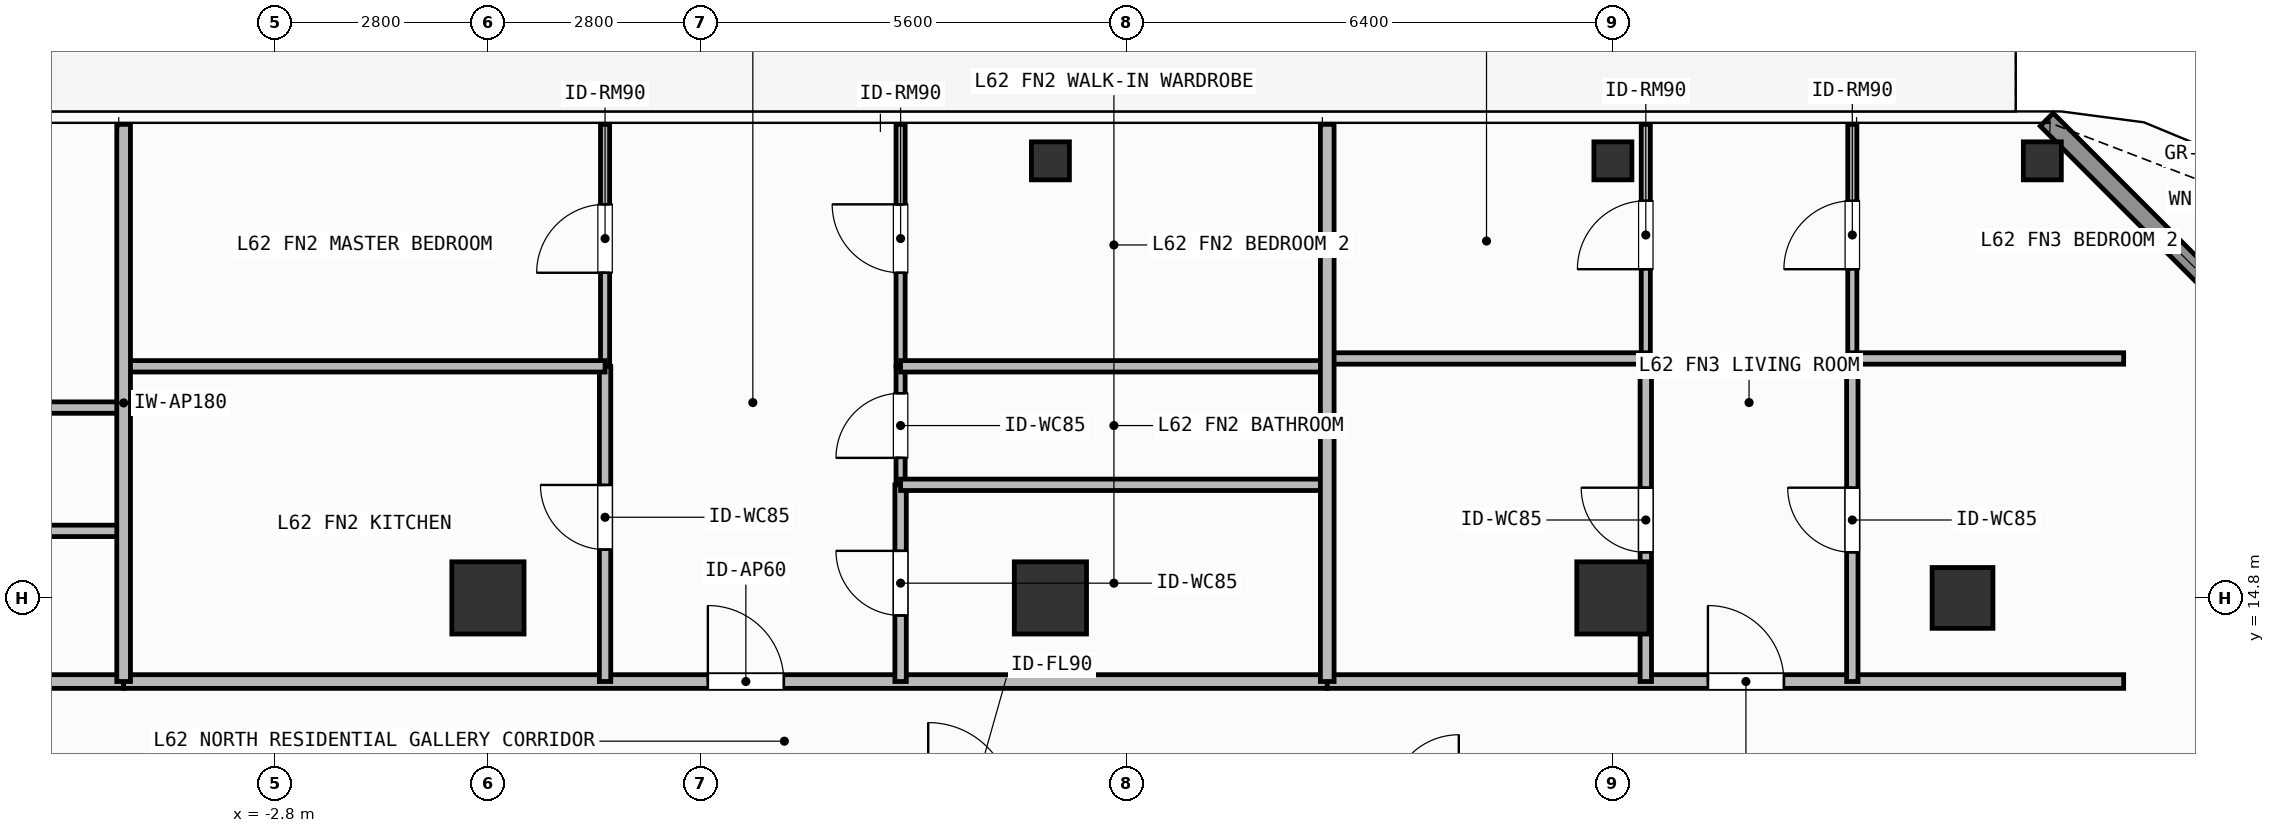
"""IFC4 building model, lengths in metres.
Left out: names, types, materials, properties, quantities, classifications, styles, units other than length and angle.
Written with IfcOpenShell. Run it as: python <this file> out.ifc"""

import sys

from ifc_helpers import new_model, si_unit, direction, frame, frame_2d, origin, origin_2d, place, context, subcontext, project, spatial, rectangle, hollow_rectangle, extrude, element, fill, save


model = new_model("IFC4")
c1 = context("Model", 3, precision=1e-05, world=origin(), true_north=direction((0.0, 1.0)))
c2 = subcontext(c1, "Body", "Model", "MODEL_VIEW")
j1 = project(units=[si_unit("LENGTHUNIT", "METRE"), si_unit("PLANEANGLEUNIT", "RADIAN")], contexts=[c1])
p1 = place(None, origin())
s1 = spatial("IfcSite", under=j1, at=p1, CompositionType="ELEMENT")
p2 = place(p1, origin())
s2 = spatial("IfcBuilding", under=s1, at=p2, CompositionType="ELEMENT")
p3 = place(p2, frame((0.0, 0.0, 254.7)))
s3 = spatial("IfcBuildingStorey", under=s2, at=p3, CompositionType="ELEMENT", Elevation=254.7)
for number, where, z_axis, x_axis in (
    (1, (0.0, 14.8, 0.0), (0.0, 0.0, 1.0), (1.0, 0.0, 0.0)),
    (2, (7.4, 14.8, 0.0), (0.0, 0.0, 1.0), (1.0, 0.0, 0.0)),
    (3, (14.8, 14.8, 0.0), (0.0, 0.0, 1.0), (1.0, 0.0, 0.0)),
):
    element("IfcColumn", number, at=place(p3, frame(where, z_axis=z_axis, x_axis=x_axis)), inside=s3, PredefinedType="COLUMN", context=c2, shape_type="SweptSolid", body=[
        extrude(rectangle(XDim=0.95, YDim=0.95, at=origin_2d()), origin(), (0.0, 0.0, 1.0), 3.9),
    ])
p4 = place(p3, frame((19.4, 14.8, 0.0), z_axis=(0.0, 0.0, 1.0), x_axis=(1.0, 0.0, 0.0)))
e4 = element("IfcColumn", 4, at=p4, inside=s3, PredefinedType="COLUMN", context=c2, shape_type="SweptSolid", body=[
    extrude(hollow_rectangle(XDim=0.8, YDim=0.8, WallThickness=0.036, at=origin_2d()), origin(), (0.0, 0.0, 1.0), 3.9),
])
for number, where, z_axis, x_axis in (
    (5, (20.45, 20.55, 0.0), (0.0, 0.0, 1.0), (1.0, 0.0, 0.0)),
    (6, (7.4, 20.55, 0.0), (0.0, 0.0, 1.0), (1.0, 0.0, 0.0)),
    (7, (14.8, 20.55, 0.0), (0.0, 0.0, 1.0), (1.0, 0.0, 0.0)),
):
    element("IfcColumn", number, at=place(p3, frame(where, z_axis=z_axis, x_axis=x_axis)), inside=s3, PredefinedType="COLUMN", context=c2, shape_type="SweptSolid", body=[
        extrude(hollow_rectangle(XDim=0.5, YDim=0.5, WallThickness=0.025, at=origin_2d()), origin(), (0.0, 0.0, 1.0), 3.9),
    ])
p5 = place(p3, frame((20.508, 21.092, 0.0), z_axis=(0.0, 0.0, 1.0), x_axis=(0.707126925818, -0.707086635981, 0.0)))
e8 = element("IfcWall", 8, at=p5, inside=s3, PredefinedType="SOLIDWALL", context=c2, shape_type="SweptSolid", body=[
    extrude(rectangle(XDim=6.06, YDim=0.24, at=frame_2d((3.03, 0.0))), origin(), (0.0, 0.0, 1.0), 3.68),
])
p6 = place(p5, frame((2.28, 0.0, 0.8)))
e9 = element("IfcOpeningElement", 9, at=p6, cuts=e8, PredefinedType="OPENING", context=c2, shape_type="SweptSolid", body=[
    extrude(rectangle(XDim=1.5, YDim=1.85, at=frame_2d((0.75, 0.925))), frame((0.0, 0.13, 0.0), z_axis=(0.0, -1.0, 0.0), x_axis=(1.0, 0.0, 0.0)), (0.0, 0.0, 1.0), 0.26),
])
p7 = place(p3, frame((-13.72, 13.7, 0.0), z_axis=(0.0, 0.0, 1.0), x_axis=(1.0, 0.0, 0.0)))
e10 = element("IfcWall", 10, at=p7, inside=s3, PredefinedType="PARTITIONING", context=c2, shape_type="SweptSolid", body=[
    extrude(rectangle(XDim=8.927, YDim=0.18, at=frame_2d((4.463, 0.0))), origin(), (0.0, 0.0, 1.0), 3.68),
])
p8 = place(p7, frame((1.752, 0.0, 0.0)))
e11 = element("IfcOpeningElement", 11, at=p8, cuts=e10, PredefinedType="OPENING", context=c2, shape_type="SweptSolid", body=[
    extrude(rectangle(XDim=1.0, YDim=2.2, at=frame_2d((0.5, 1.1))), frame((0.0, 0.1, 0.0), z_axis=(0.0, -1.0, 0.0), x_axis=(1.0, 0.0, 0.0)), (0.0, 0.0, 1.0), 0.2),
])
p9 = place(p3, frame((-4.793, 13.7, 0.0), z_axis=(0.0, 0.0, 1.0), x_axis=(1.0, 0.0, 0.0)))
e12 = element("IfcWall", 12, at=p9, inside=s3, PredefinedType="PARTITIONING", context=c2, shape_type="SweptSolid", body=[
    extrude(rectangle(XDim=15.835, YDim=0.18, at=frame_2d((7.917, 0.0))), origin(), (0.0, 0.0, 1.0), 3.68),
])
p10 = place(p9, frame((7.686, 0.0, 0.0)))
e13 = element("IfcOpeningElement", 13, at=p10, cuts=e12, PredefinedType="OPENING", context=c2, shape_type="SweptSolid", body=[
    extrude(rectangle(XDim=1.0, YDim=2.2, at=frame_2d((0.5, 1.1))), frame((0.0, 0.1, 0.0), z_axis=(0.0, -1.0, 0.0), x_axis=(1.0, 0.0, 0.0)), (0.0, 0.0, 1.0), 0.2),
])
p11 = place(p3, frame((1.541, 13.7, 0.0), z_axis=(0.0, 0.0, 1.0), x_axis=(0.0, 1.0, 0.0)))
e14 = element("IfcWall", 14, at=p11, inside=s3, PredefinedType="PARTITIONING", context=c2, shape_type="SweptSolid", body=[
    extrude(rectangle(XDim=4.147, YDim=0.15, at=frame_2d((2.073, 0.0))), origin(), (0.0, 0.0, 1.0), 3.68),
])
p12 = place(p11, frame((1.736, 0.0, 0.0)))
e15 = element("IfcOpeningElement", 15, at=p12, cuts=e14, PredefinedType="OPENING", context=c2, shape_type="SweptSolid", body=[
    extrude(rectangle(XDim=0.85, YDim=2.1, at=frame_2d((0.425, 1.05))), frame((0.0, 0.085, 0.0), z_axis=(0.0, -1.0, 0.0), x_axis=(1.0, 0.0, 0.0)), (0.0, 0.0, 1.0), 0.17),
])
p13 = place(p3, frame((1.541, 17.847, 0.0), z_axis=(0.0, 0.0, 1.0), x_axis=(0.0, 1.0, 0.0)))
e16 = element("IfcWall", 16, at=p13, inside=s3, PredefinedType="PARTITIONING", context=c2, shape_type="SweptSolid", body=[
    extrude(rectangle(XDim=3.183, YDim=0.12, at=frame_2d((1.592, 0.0))), origin(), (0.0, 0.0, 1.0), 3.68),
])
p14 = place(p13, frame((1.231, 0.0, 0.0)))
e17 = element("IfcOpeningElement", 17, at=p14, cuts=e16, PredefinedType="OPENING", context=c2, shape_type="SweptSolid", body=[
    extrude(rectangle(XDim=0.9, YDim=2.1, at=frame_2d((0.45, 1.05))), frame((0.0, 0.07, 0.0), z_axis=(0.0, -1.0, 0.0), x_axis=(1.0, 0.0, 0.0)), (0.0, 0.0, 1.0), 0.14),
])
p15 = place(p3, frame((5.429, 13.7, 0.0), z_axis=(0.0, 0.0, 1.0), x_axis=(0.0, 1.0, 0.0)))
e18 = element("IfcWall", 18, at=p15, inside=s3, PredefinedType="PARTITIONING", context=c2, shape_type="SweptSolid", body=[
    extrude(rectangle(XDim=2.588, YDim=0.15, at=frame_2d((1.294, 0.0))), origin(), (0.0, 0.0, 1.0), 3.68),
])
p16 = place(p15, frame((0.869, 0.0, 0.0)))
e19 = element("IfcOpeningElement", 19, at=p16, cuts=e18, PredefinedType="OPENING", context=c2, shape_type="SweptSolid", body=[
    extrude(rectangle(XDim=0.85, YDim=2.1, at=frame_2d((0.425, 1.05))), frame((0.0, 0.085, 0.0), z_axis=(0.0, -1.0, 0.0), x_axis=(1.0, 0.0, 0.0)), (0.0, 0.0, 1.0), 0.17),
])
p17 = place(p3, frame((5.429, 16.288, 0.0), z_axis=(0.0, 0.0, 1.0), x_axis=(0.0, 1.0, 0.0)))
e20 = element("IfcWall", 20, at=p17, inside=s3, PredefinedType="PARTITIONING", context=c2, shape_type="SweptSolid", body=[
    extrude(rectangle(XDim=1.559, YDim=0.12, at=frame_2d((0.779, 0.0))), origin(), (0.0, 0.0, 1.0), 3.68),
])
p18 = place(p17, frame((0.354, 0.0, 0.0)))
e21 = element("IfcOpeningElement", 21, at=p18, cuts=e20, PredefinedType="OPENING", context=c2, shape_type="SweptSolid", body=[
    extrude(rectangle(XDim=0.85, YDim=2.1, at=frame_2d((0.425, 1.05))), frame((0.0, 0.07, 0.0), z_axis=(0.0, -1.0, 0.0), x_axis=(1.0, 0.0, 0.0)), (0.0, 0.0, 1.0), 0.14),
])
p19 = place(p3, frame((5.429, 17.847, 0.0), z_axis=(0.0, 0.0, 1.0), x_axis=(0.0, 1.0, 0.0)))
e22 = element("IfcWall", 22, at=p19, inside=s3, PredefinedType="PARTITIONING", context=c2, shape_type="SweptSolid", body=[
    extrude(rectangle(XDim=3.183, YDim=0.12, at=frame_2d((1.592, 0.0))), origin(), (0.0, 0.0, 1.0), 3.68),
])
p20 = place(p19, frame((1.231, 0.0, 0.0)))
e23 = element("IfcOpeningElement", 23, at=p20, cuts=e22, PredefinedType="OPENING", context=c2, shape_type="SweptSolid", body=[
    extrude(rectangle(XDim=0.9, YDim=2.1, at=frame_2d((0.45, 1.05))), frame((0.0, 0.07, 0.0), z_axis=(0.0, -1.0, 0.0), x_axis=(1.0, 0.0, 0.0)), (0.0, 0.0, 1.0), 0.14),
])
p21 = place(p3, frame((11.042, 13.7, 0.0), z_axis=(0.0, 0.0, 1.0), x_axis=(1.0, 0.0, 0.0)))
e24 = element("IfcWall", 24, at=p21, inside=s3, PredefinedType="PARTITIONING", context=c2, shape_type="SweptSolid", body=[
    extrude(rectangle(XDim=10.478, YDim=0.18, at=frame_2d((5.239, 0.0))), origin(), (0.0, 0.0, 1.0), 3.68),
])
p22 = place(p21, frame((5.008, 0.0, 0.0)))
e25 = element("IfcOpeningElement", 25, at=p22, cuts=e24, PredefinedType="OPENING", context=c2, shape_type="SweptSolid", body=[
    extrude(rectangle(XDim=1.0, YDim=2.2, at=frame_2d((0.5, 1.1))), frame((0.0, 0.1, 0.0), z_axis=(0.0, -1.0, 0.0), x_axis=(1.0, 0.0, 0.0)), (0.0, 0.0, 1.0), 0.2),
])
p23 = place(p3, frame((15.233, 13.7, 0.0), z_axis=(0.0, 0.0, 1.0), x_axis=(0.0, 1.0, 0.0)))
e26 = element("IfcWall", 26, at=p23, inside=s3, PredefinedType="PARTITIONING", context=c2, shape_type="SweptSolid", body=[
    extrude(rectangle(XDim=4.25, YDim=0.15, at=frame_2d((2.125, 0.0))), origin(), (0.0, 0.0, 1.0), 3.68),
])
p24 = place(p23, frame((1.7, 0.0, 0.0)))
e27 = element("IfcOpeningElement", 27, at=p24, cuts=e26, PredefinedType="OPENING", context=c2, shape_type="SweptSolid", body=[
    extrude(rectangle(XDim=0.85, YDim=2.1, at=frame_2d((0.425, 1.05))), frame((0.0, 0.085, 0.0), z_axis=(0.0, -1.0, 0.0), x_axis=(1.0, 0.0, 0.0)), (0.0, 0.0, 1.0), 0.17),
])
p25 = place(p3, frame((15.233, 17.95, 0.0), z_axis=(0.0, 0.0, 1.0), x_axis=(0.0, 1.0, 0.0)))
e28 = element("IfcWall", 28, at=p25, inside=s3, PredefinedType="PARTITIONING", context=c2, shape_type="SweptSolid", body=[
    extrude(rectangle(XDim=3.08, YDim=0.12, at=frame_2d((1.54, 0.0))), origin(), (0.0, 0.0, 1.0), 3.68),
])
p26 = place(p25, frame((1.175, 0.0, 0.0)))
e29 = element("IfcOpeningElement", 29, at=p26, cuts=e28, PredefinedType="OPENING", context=c2, shape_type="SweptSolid", body=[
    extrude(rectangle(XDim=0.9, YDim=2.1, at=frame_2d((0.45, 1.05))), frame((0.0, 0.07, 0.0), z_axis=(0.0, -1.0, 0.0), x_axis=(1.0, 0.0, 0.0)), (0.0, 0.0, 1.0), 0.14),
])
p27 = place(p3, frame((17.95, 13.7, 0.0), z_axis=(0.0, 0.0, 1.0), x_axis=(0.0, 1.0, 0.0)))
e30 = element("IfcWall", 30, at=p27, inside=s3, PredefinedType="PARTITIONING", context=c2, shape_type="SweptSolid", body=[
    extrude(rectangle(XDim=4.25, YDim=0.15, at=frame_2d((2.125, 0.0))), origin(), (0.0, 0.0, 1.0), 3.68),
])
p28 = place(p27, frame((1.7, 0.0, 0.0)))
e31 = element("IfcOpeningElement", 31, at=p28, cuts=e30, PredefinedType="OPENING", context=c2, shape_type="SweptSolid", body=[
    extrude(rectangle(XDim=0.85, YDim=2.1, at=frame_2d((0.425, 1.05))), frame((0.0, 0.085, 0.0), z_axis=(0.0, -1.0, 0.0), x_axis=(1.0, 0.0, 0.0)), (0.0, 0.0, 1.0), 0.17),
])
p29 = place(p3, frame((17.95, 17.95, 0.0), z_axis=(0.0, 0.0, 1.0), x_axis=(0.0, 1.0, 0.0)))
e32 = element("IfcWall", 32, at=p29, inside=s3, PredefinedType="PARTITIONING", context=c2, shape_type="SweptSolid", body=[
    extrude(rectangle(XDim=3.08, YDim=0.12, at=frame_2d((1.54, 0.0))), origin(), (0.0, 0.0, 1.0), 3.68),
])
p30 = place(p29, frame((1.175, 0.0, 0.0)))
e33 = element("IfcOpeningElement", 33, at=p30, cuts=e32, PredefinedType="OPENING", context=c2, shape_type="SweptSolid", body=[
    extrude(rectangle(XDim=0.9, YDim=2.1, at=frame_2d((0.45, 1.05))), frame((0.0, 0.07, 0.0), z_axis=(0.0, -1.0, 0.0), x_axis=(1.0, 0.0, 0.0)), (0.0, 0.0, 1.0), 0.14),
])
for number, where, z_axis, x_axis in (
    (34, (-9.792, 15.682, 0.0), (0.0, 0.0, 1.0), (1.0, 0.0, 0.0)),
    (35, (-9.792, 17.304, 0.0), (0.0, 0.0, 1.0), (1.0, 0.0, 0.0)),
):
    element("IfcWall", number, at=place(p3, frame(where, z_axis=z_axis, x_axis=x_axis)), inside=s3, PredefinedType="PARTITIONING", context=c2, shape_type="SweptSolid", body=[
        extrude(rectangle(XDim=4.999, YDim=0.15, at=frame_2d((2.5, 0.0))), origin(), (0.0, 0.0, 1.0), 3.68),
    ])
p31 = place(p3, frame((-4.793, 17.847, 0.0), z_axis=(0.0, 0.0, 1.0), x_axis=(1.0, 0.0, 0.0)))
e36 = element("IfcWall", 36, at=p31, inside=s3, PredefinedType="PARTITIONING", context=c2, shape_type="SweptSolid", body=[
    extrude(rectangle(XDim=6.334, YDim=0.15, at=frame_2d((3.167, 0.0))), origin(), (0.0, 0.0, 1.0), 3.68),
])
for number, where, z_axis, x_axis in (
    (37, (5.429, 16.288, 0.0), (0.0, 0.0, 1.0), (1.0, 0.0, 0.0)),
    (38, (5.429, 17.847, 0.0), (0.0, 0.0, 1.0), (1.0, 0.0, 0.0)),
):
    element("IfcWall", number, at=place(p3, frame(where, z_axis=z_axis, x_axis=x_axis)), inside=s3, PredefinedType="PARTITIONING", context=c2, shape_type="SweptSolid", body=[
        extrude(rectangle(XDim=5.613, YDim=0.15, at=frame_2d((2.807, 0.0))), origin(), (0.0, 0.0, 1.0), 3.68),
    ])
p32 = place(p3, frame((-4.793, 13.7, 0.0), z_axis=(0.0, 0.0, 1.0), x_axis=(0.0, 1.0, 0.0)))
e39 = element("IfcWall", 39, at=p32, inside=s3, PredefinedType="PARTITIONING", context=c2, shape_type="SweptSolid", body=[
    extrude(rectangle(XDim=7.33, YDim=0.18, at=frame_2d((3.665, 0.0))), origin(), (0.0, 0.0, 1.0), 3.68),
])
p33 = place(p3, frame((11.042, 17.95, 0.0), z_axis=(0.0, 0.0, 1.0), x_axis=(1.0, 0.0, 0.0)))
e40 = element("IfcWall", 40, at=p33, inside=s3, PredefinedType="PARTITIONING", context=c2, shape_type="SweptSolid", body=[
    extrude(rectangle(XDim=4.191, YDim=0.15, at=frame_2d((2.095, 0.0))), origin(), (0.0, 0.0, 1.0), 3.68),
])
p34 = place(p3, frame((17.95, 17.95, 0.0), z_axis=(0.0, 0.0, 1.0), x_axis=(1.0, 0.0, 0.0)))
e41 = element("IfcWall", 41, at=p34, inside=s3, PredefinedType="PARTITIONING", context=c2, shape_type="SweptSolid", body=[
    extrude(rectangle(XDim=3.57, YDim=0.15, at=frame_2d((1.785, 0.0))), origin(), (0.0, 0.0, 1.0), 3.68),
])
p35 = place(p3, frame((11.042, 13.7, 0.0), z_axis=(0.0, 0.0, 1.0), x_axis=(0.0, 1.0, 0.0)))
e42 = element("IfcWall", 42, at=p35, inside=s3, PredefinedType="PARTITIONING", context=c2, shape_type="SweptSolid", body=[
    extrude(rectangle(XDim=7.33, YDim=0.18, at=frame_2d((3.665, 0.0))), origin(), (0.0, 0.0, 1.0), 3.42),
])
p36 = place(p6, origin())
e43 = element("IfcWindow", 43, at=p36, inside=s3, PartitioningType="SINGLE_PANEL", PredefinedType="WINDOW", context=c2, shape_type="SweptSolid", body=[
    extrude(rectangle(XDim=1.5, YDim=1.85, at=frame_2d((0.75, 0.925))), frame((0.0, 0.03, 0.0), z_axis=(0.0, -1.0, 0.0), x_axis=(1.0, 0.0, 0.0)), (0.0, 0.0, 1.0), 0.06),
])
fill(e9, e43)
p37 = place(p10, origin())
e44 = element("IfcDoor", 44, at=p37, inside=s3, OperationType="SINGLE_SWING_LEFT", PredefinedType="DOOR", context=c2, shape_type="SweptSolid", body=[
    extrude(rectangle(XDim=1.0, YDim=2.2, at=frame_2d((0.5, 1.1))), frame((0.0, 0.025, 0.0), z_axis=(0.0, -1.0, 0.0), x_axis=(1.0, 0.0, 0.0)), (0.0, 0.0, 1.0), 0.05),
])
fill(e13, e44)
p38 = place(p12, origin())
e45 = element("IfcDoor", 45, at=p38, inside=s3, OperationType="SINGLE_SWING_RIGHT", PredefinedType="DOOR", context=c2, shape_type="SweptSolid", body=[
    extrude(rectangle(XDim=0.85, YDim=2.1, at=frame_2d((0.425, 1.05))), frame((0.0, 0.025, 0.0), z_axis=(0.0, -1.0, 0.0), x_axis=(1.0, 0.0, 0.0)), (0.0, 0.0, 1.0), 0.05),
])
fill(e15, e45)
p39 = place(p14, origin())
e46 = element("IfcDoor", 46, at=p39, inside=s3, OperationType="SINGLE_SWING_LEFT", PredefinedType="DOOR", context=c2, shape_type="SweptSolid", body=[
    extrude(rectangle(XDim=0.9, YDim=2.1, at=frame_2d((0.45, 1.05))), frame((0.0, 0.025, 0.0), z_axis=(0.0, -1.0, 0.0), x_axis=(1.0, 0.0, 0.0)), (0.0, 0.0, 1.0), 0.05),
])
fill(e17, e46)
p40 = place(p16, origin())
e47 = element("IfcDoor", 47, at=p40, inside=s3, OperationType="SINGLE_SWING_RIGHT", PredefinedType="DOOR", context=c2, shape_type="SweptSolid", body=[
    extrude(rectangle(XDim=0.85, YDim=2.1, at=frame_2d((0.425, 1.05))), frame((0.0, 0.025, 0.0), z_axis=(0.0, -1.0, 0.0), x_axis=(1.0, 0.0, 0.0)), (0.0, 0.0, 1.0), 0.05),
])
fill(e19, e47)
p41 = place(p18, origin())
e48 = element("IfcDoor", 48, at=p41, inside=s3, OperationType="SINGLE_SWING_LEFT", PredefinedType="DOOR", context=c2, shape_type="SweptSolid", body=[
    extrude(rectangle(XDim=0.85, YDim=2.1, at=frame_2d((0.425, 1.05))), frame((0.0, 0.025, 0.0), z_axis=(0.0, -1.0, 0.0), x_axis=(1.0, 0.0, 0.0)), (0.0, 0.0, 1.0), 0.05),
])
fill(e21, e48)
p42 = place(p20, origin())
e49 = element("IfcDoor", 49, at=p42, inside=s3, OperationType="SINGLE_SWING_RIGHT", PredefinedType="DOOR", context=c2, shape_type="SweptSolid", body=[
    extrude(rectangle(XDim=0.9, YDim=2.1, at=frame_2d((0.45, 1.05))), frame((0.0, 0.025, 0.0), z_axis=(0.0, -1.0, 0.0), x_axis=(1.0, 0.0, 0.0)), (0.0, 0.0, 1.0), 0.05),
])
fill(e23, e49)
p43 = place(p22, origin())
e50 = element("IfcDoor", 50, at=p43, inside=s3, OperationType="SINGLE_SWING_LEFT", PredefinedType="DOOR", context=c2, shape_type="SweptSolid", body=[
    extrude(rectangle(XDim=1.0, YDim=2.2, at=frame_2d((0.5, 1.1))), frame((0.0, 0.025, 0.0), z_axis=(0.0, -1.0, 0.0), x_axis=(1.0, 0.0, 0.0)), (0.0, 0.0, 1.0), 0.05),
])
fill(e25, e50)
p44 = place(p24, origin())
e51 = element("IfcDoor", 51, at=p44, inside=s3, OperationType="SINGLE_SWING_RIGHT", PredefinedType="DOOR", context=c2, shape_type="SweptSolid", body=[
    extrude(rectangle(XDim=0.85, YDim=2.1, at=frame_2d((0.425, 1.05))), frame((0.0, 0.025, 0.0), z_axis=(0.0, -1.0, 0.0), x_axis=(1.0, 0.0, 0.0)), (0.0, 0.0, 1.0), 0.05),
])
fill(e27, e51)
p45 = place(p26, origin())
e52 = element("IfcDoor", 52, at=p45, inside=s3, OperationType="SINGLE_SWING_LEFT", PredefinedType="DOOR", context=c2, shape_type="SweptSolid", body=[
    extrude(rectangle(XDim=0.9, YDim=2.1, at=frame_2d((0.45, 1.05))), frame((0.0, 0.025, 0.0), z_axis=(0.0, -1.0, 0.0), x_axis=(1.0, 0.0, 0.0)), (0.0, 0.0, 1.0), 0.05),
])
fill(e29, e52)
p46 = place(p28, origin())
e53 = element("IfcDoor", 53, at=p46, inside=s3, OperationType="SINGLE_SWING_RIGHT", PredefinedType="DOOR", context=c2, shape_type="SweptSolid", body=[
    extrude(rectangle(XDim=0.85, YDim=2.1, at=frame_2d((0.425, 1.05))), frame((0.0, 0.025, 0.0), z_axis=(0.0, -1.0, 0.0), x_axis=(1.0, 0.0, 0.0)), (0.0, 0.0, 1.0), 0.05),
])
fill(e31, e53)
p47 = place(p30, origin())
e54 = element("IfcDoor", 54, at=p47, inside=s3, OperationType="SINGLE_SWING_LEFT", PredefinedType="DOOR", context=c2, shape_type="SweptSolid", body=[
    extrude(rectangle(XDim=0.9, YDim=2.1, at=frame_2d((0.45, 1.05))), frame((0.0, 0.025, 0.0), z_axis=(0.0, -1.0, 0.0), x_axis=(1.0, 0.0, 0.0)), (0.0, 0.0, 1.0), 0.05),
])
fill(e33, e54)
save(model, sys.argv[1])
